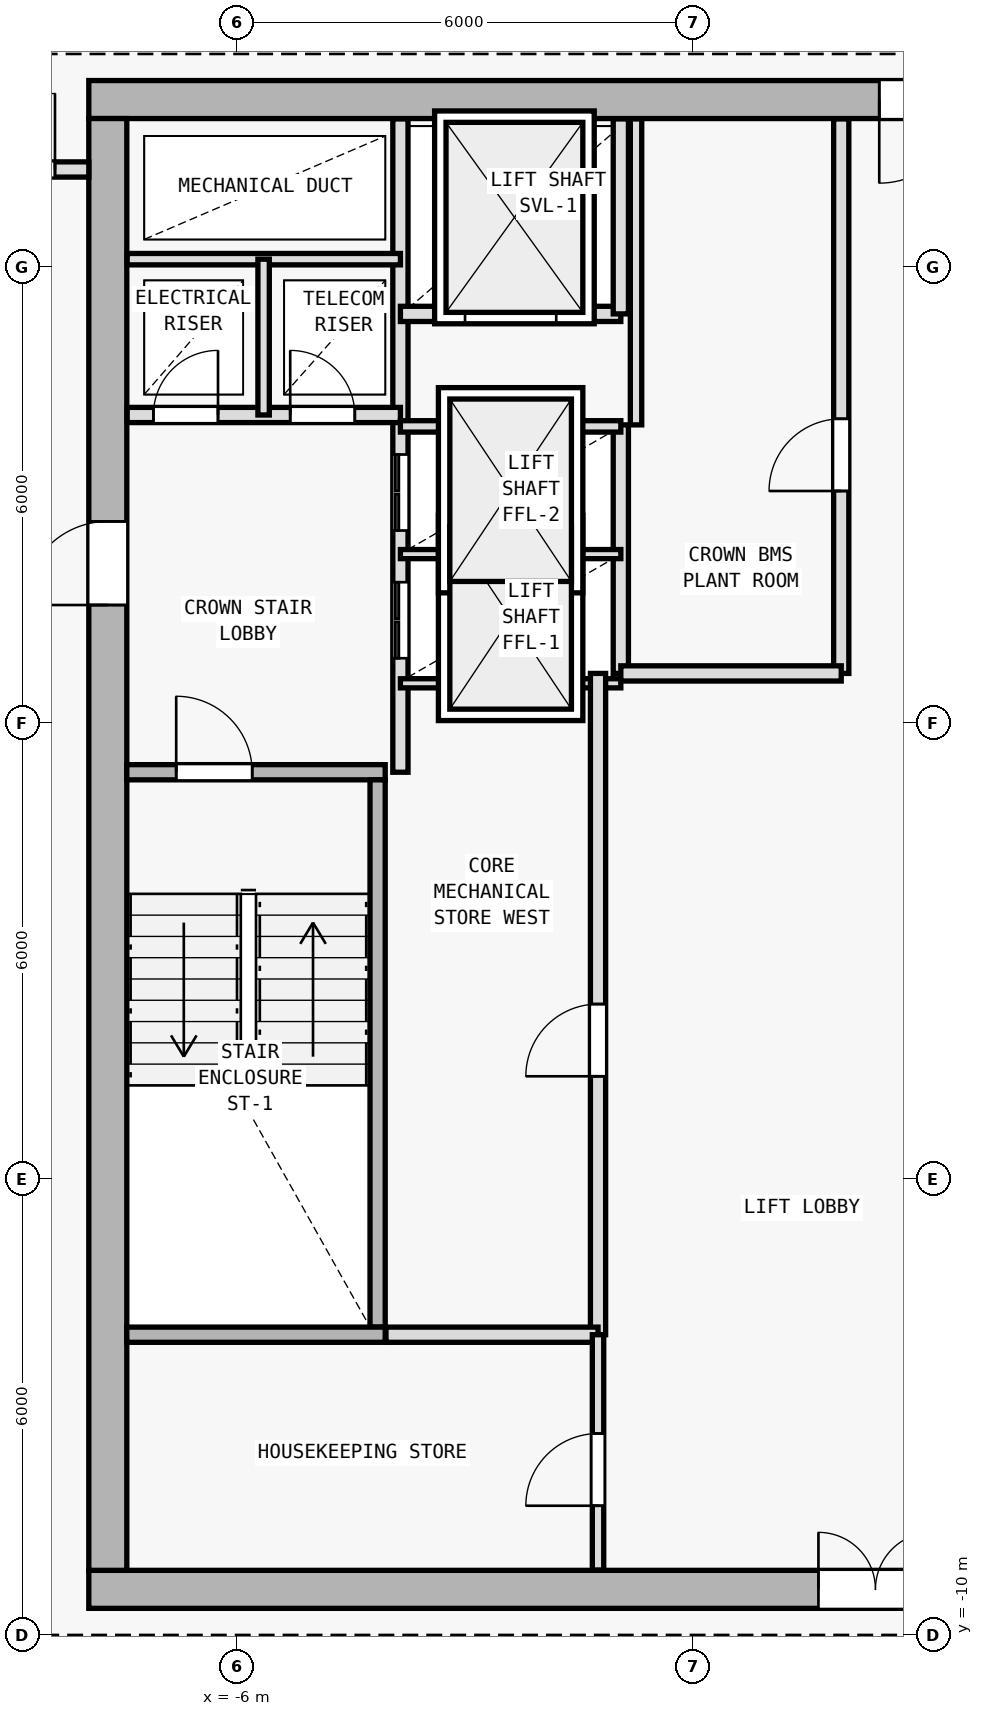
"""IFC4 building model, lengths in metres.
Left out: names, types, materials, properties, quantities, classifications, styles, units other than length and angle.
Written with IfcOpenShell. Run it as: python <this file> out.ifc"""

import sys

from ifc_helpers import new_model, si_unit, direction, frame, frame_2d, origin, origin_2d, place, context, subcontext, project, spatial, rectangle, i_section, extrude, element, fill, save


model = new_model("IFC4")
c1 = context("Model", 3, precision=1e-05, world=origin(), true_north=direction((0.0, 1.0)))
c2 = subcontext(c1, "Body", "Model", "MODEL_VIEW")
j1 = project(units=[si_unit("LENGTHUNIT", "METRE"), si_unit("PLANEANGLEUNIT", "RADIAN")], contexts=[c1])
p1 = place(None, origin())
s1 = spatial("IfcSite", under=j1, at=p1, CompositionType="ELEMENT")
p2 = place(p1, origin())
s2 = spatial("IfcBuilding", under=s1, at=p2, CompositionType="ELEMENT")
p3 = place(p2, frame((0.0, 0.0, 312.0)))
s3 = spatial("IfcBuildingStorey", under=s2, at=p3, CompositionType="ELEMENT", Elevation=312.0)
for number, where, z_axis, x_axis in (
    (1, (-7.7, -9.4, 0.0), (0.0, 0.0, 1.0), (1.0, 0.0, 0.0)),
    (2, (-7.7, 10.2, 0.0), (0.0, 0.0, 1.0), (1.0, 0.0, 0.0)),
    (3, (0.0, -9.4, 0.0), (0.0, 0.0, 1.0), (1.0, 0.0, 0.0)),
    (4, (-7.7, 2.0, 0.0), (0.0, 0.0, 1.0), (1.0, 0.0, 0.0)),
):
    element("IfcColumn", number, at=place(p3, frame(where, z_axis=z_axis, x_axis=x_axis)), inside=s3, PredefinedType="COLUMN", context=c2, shape_type="SweptSolid", body=[
        extrude(i_section(OverallWidth=0.374, OverallDepth=0.372, WebThickness=0.012, FlangeThickness=0.02, FilletRadius=0.015, at=origin_2d()), origin(), (0.0, 0.0, 1.0), 3.6),
    ])
p4 = place(p3, frame((-7.95, -9.4, 0.0), z_axis=(0.0, 0.0, 1.0), x_axis=(1.0, 0.0, 0.0)))
e5 = element("IfcWall", 5, at=p4, inside=s3, PredefinedType="SHEAR", context=c2, shape_type="SweptSolid", body=[
    extrude(rectangle(XDim=15.9, YDim=0.5, at=frame_2d((7.95, 0.0))), origin(), (0.0, 0.0, 1.0), 3.34),
])
p5 = place(p4, frame((9.6, 0.0, 0.0)))
e6 = element("IfcOpeningElement", 6, at=p5, cuts=e5, PredefinedType="OPENING", context=c2, shape_type="SweptSolid", body=[
    extrude(rectangle(XDim=1.5, YDim=2.2, at=frame_2d((0.75, 1.1))), frame((0.0, 0.26, 0.0), z_axis=(0.0, -1.0, 0.0), x_axis=(1.0, 0.0, 0.0)), (0.0, 0.0, 1.0), 0.52),
])
p6 = place(p3, frame((7.95, 10.2, 0.0), z_axis=(0.0, 0.0, 1.0), x_axis=(-1.0, 0.0, 0.0)))
e7 = element("IfcWall", 7, at=p6, inside=s3, PredefinedType="SHEAR", context=c2, shape_type="SweptSolid", body=[
    extrude(rectangle(XDim=15.9, YDim=0.5, at=frame_2d((7.95, 0.0))), origin(), (0.0, 0.0, 1.0), 3.34),
])
p7 = place(p6, frame((4.4, 0.0, 0.0)))
e8 = element("IfcOpeningElement", 8, at=p7, cuts=e7, PredefinedType="OPENING", context=c2, shape_type="SweptSolid", body=[
    extrude(rectangle(XDim=1.1, YDim=2.15, at=frame_2d((0.55, 1.075))), frame((0.0, 0.26, 0.0), z_axis=(0.0, -1.0, 0.0), x_axis=(1.0, 0.0, 0.0)), (0.0, 0.0, 1.0), 0.52),
])
p8 = place(p3, frame((-7.7, -9.15, 0.0), z_axis=(0.0, 0.0, 1.0), x_axis=(0.0, 1.0, 0.0)))
e9 = element("IfcWall", 9, at=p8, inside=s3, PredefinedType="SHEAR", context=c2, shape_type="SweptSolid", body=[
    extrude(rectangle(XDim=19.1, YDim=0.5, at=frame_2d((9.55, 0.0))), origin(), (0.0, 0.0, 1.0), 3.34),
])
p9 = place(p8, frame((12.7, 0.0, 0.0)))
e10 = element("IfcOpeningElement", 10, at=p9, cuts=e9, PredefinedType="OPENING", context=c2, shape_type="SweptSolid", body=[
    extrude(rectangle(XDim=1.1, YDim=2.15, at=frame_2d((0.55, 1.075))), frame((0.0, 0.26, 0.0), z_axis=(0.0, -1.0, 0.0), x_axis=(1.0, 0.0, 0.0)), (0.0, 0.0, 1.0), 0.52),
])
p10 = place(p3, frame((-7.45, 1.35, 0.0), z_axis=(0.0, 0.0, 1.0), x_axis=(1.0, 0.0, 0.0)))
e11 = element("IfcWall", 11, at=p10, inside=s3, PredefinedType="SOLIDWALL", context=c2, shape_type="SweptSolid", body=[
    extrude(rectangle(XDim=3.4, YDim=0.2, at=frame_2d((1.7, 0.0))), origin(), (0.0, 0.0, 1.0), 3.34),
])
p11 = place(p10, frame((0.65, 0.0, 0.0)))
e12 = element("IfcOpeningElement", 12, at=p11, cuts=e11, PredefinedType="OPENING", context=c2, shape_type="SweptSolid", body=[
    extrude(rectangle(XDim=1.0, YDim=2.15, at=frame_2d((0.5, 1.075))), frame((0.0, 0.11, 0.0), z_axis=(0.0, -1.0, 0.0), x_axis=(1.0, 0.0, 0.0)), (0.0, 0.0, 1.0), 0.22),
])
p12 = place(p3, frame((-4.15, -5.95, 0.0), z_axis=(0.0, 0.0, 1.0), x_axis=(0.0, 1.0, 0.0)))
e13 = element("IfcWall", 13, at=p12, inside=s3, PredefinedType="SOLIDWALL", context=c2, shape_type="SweptSolid", body=[
    extrude(rectangle(XDim=7.2, YDim=0.2, at=frame_2d((3.6, 0.0))), origin(), (0.0, 0.0, 1.0), 3.34),
])
p13 = place(p3, frame((-3.85, 1.35, 0.0), z_axis=(0.0, 0.0, 1.0), x_axis=(0.0, 1.0, 0.0)))
e14 = element("IfcWall", 14, at=p13, inside=s3, PredefinedType="SOLIDWALL", context=c2, shape_type="SweptSolid", body=[
    extrude(rectangle(XDim=8.595, YDim=0.2, at=frame_2d((4.297, 0.0))), origin(), (0.0, 0.0, 1.0), 3.34),
])
p14 = place(p13, frame((1.5, 0.0, 0.0)))
e15 = element("IfcOpeningElement", 15, at=p14, cuts=e14, PredefinedType="OPENING", context=c2, shape_type="SweptSolid", body=[
    extrude(rectangle(XDim=1.0, YDim=2.15, at=frame_2d((0.5, 1.075))), frame((0.0, 0.11, 0.0), z_axis=(0.0, -1.0, 0.0), x_axis=(1.0, 0.0, 0.0)), (0.0, 0.0, 1.0), 0.22),
])
p15 = place(p13, frame((3.18, 0.0, 0.0)))
e16 = element("IfcOpeningElement", 16, at=p15, cuts=e14, PredefinedType="OPENING", context=c2, shape_type="SweptSolid", body=[
    extrude(rectangle(XDim=1.0, YDim=2.15, at=frame_2d((0.5, 1.075))), frame((0.0, 0.11, 0.0), z_axis=(0.0, -1.0, 0.0), x_axis=(1.0, 0.0, 0.0)), (0.0, 0.0, 1.0), 0.22),
])
p16 = place(p3, frame((-7.445, 6.05, 0.0), z_axis=(0.0, 0.0, 1.0), x_axis=(1.0, 0.0, 0.0)))
e17 = element("IfcWall", 17, at=p16, inside=s3, PredefinedType="SOLIDWALL", context=c2, shape_type="SweptSolid", body=[
    extrude(rectangle(XDim=3.595, YDim=0.2, at=frame_2d((1.797, 0.0))), origin(), (0.0, 0.0, 1.0), 3.34),
])
p17 = place(p16, frame((0.345, 0.0, 0.0)))
e18 = element("IfcOpeningElement", 18, at=p17, cuts=e17, PredefinedType="OPENING", context=c2, shape_type="SweptSolid", body=[
    extrude(rectangle(XDim=0.85, YDim=2.1, at=frame_2d((0.425, 1.05))), frame((0.0, 0.11, 0.0), z_axis=(0.0, -1.0, 0.0), x_axis=(1.0, 0.0, 0.0)), (0.0, 0.0, 1.0), 0.22),
])
p18 = place(p16, frame((2.145, 0.0, 0.0)))
e19 = element("IfcOpeningElement", 19, at=p18, cuts=e17, PredefinedType="OPENING", context=c2, shape_type="SweptSolid", body=[
    extrude(rectangle(XDim=0.85, YDim=2.1, at=frame_2d((0.425, 1.05))), frame((0.0, 0.11, 0.0), z_axis=(0.0, -1.0, 0.0), x_axis=(1.0, 0.0, 0.0)), (0.0, 0.0, 1.0), 0.22),
])
p19 = place(p3, frame((-7.445, 8.1, 0.0), z_axis=(0.0, 0.0, 1.0), x_axis=(1.0, 0.0, 0.0)))
e20 = element("IfcWall", 20, at=p19, inside=s3, PredefinedType="PARTITIONING", context=c2, shape_type="SweptSolid", body=[
    extrude(rectangle(XDim=3.595, YDim=0.15, at=frame_2d((1.797, 0.0))), origin(), (0.0, 0.0, 1.0), 3.34),
])
p20 = place(p3, frame((-5.65, 6.05, 0.0), z_axis=(0.0, 0.0, 1.0), x_axis=(0.0, 1.0, 0.0)))
e21 = element("IfcWall", 21, at=p20, inside=s3, PredefinedType="PARTITIONING", context=c2, shape_type="SweptSolid", body=[
    extrude(rectangle(XDim=2.05, YDim=0.15, at=frame_2d((1.025, 0.0))), origin(), (0.0, 0.0, 1.0), 3.34),
])
p21 = place(p3, frame((-0.95, 2.65, 0.0), z_axis=(0.0, 0.0, 1.0), x_axis=(0.0, 1.0, 0.0)))
e22 = element("IfcWall", 22, at=p21, inside=s3, PredefinedType="SOLIDWALL", context=c2, shape_type="SweptSolid", body=[
    extrude(rectangle(XDim=3.27, YDim=0.2, at=frame_2d((1.635, 0.0))), origin(), (0.0, 0.0, 1.0), 3.34),
])
for number, where, z_axis, x_axis in (
    (23, (-3.85, 2.52, 0.0), (0.0, 0.0, 1.0), (1.0, 0.0, 0.0)),
    (24, (-3.85, 4.22, 0.0), (0.0, 0.0, 1.0), (1.0, 0.0, 0.0)),
):
    element("IfcWall", number, at=place(p3, frame(where, z_axis=z_axis, x_axis=x_axis)), inside=s3, PredefinedType="PARTITIONING", context=c2, shape_type="SweptSolid", body=[
        extrude(rectangle(XDim=2.9, YDim=0.12, at=frame_2d((1.45, 0.0))), origin(), (0.0, 0.0, 1.0), 3.34),
    ])
p22 = place(p3, frame((-3.85, 5.9, 0.0), z_axis=(0.0, 0.0, 1.0), x_axis=(1.0, 0.0, 0.0)))
e25 = element("IfcWall", 25, at=p22, inside=s3, PredefinedType="PARTITIONING", context=c2, shape_type="SweptSolid", body=[
    extrude(rectangle(XDim=2.9, YDim=0.15, at=frame_2d((1.45, 0.0))), origin(), (0.0, 0.0, 1.0), 3.34),
])
p23 = place(p3, frame((-3.85, 7.38, 0.0), z_axis=(0.0, 0.0, 1.0), x_axis=(1.0, 0.0, 0.0)))
e26 = element("IfcWall", 26, at=p23, inside=s3, PredefinedType="SOLIDWALL", context=c2, shape_type="SweptSolid", body=[
    extrude(rectangle(XDim=2.9, YDim=0.2, at=frame_2d((1.45, 0.0))), origin(), (0.0, 0.0, 1.0), 3.34),
])
p24 = place(p23, frame((0.85, 0.0, 0.0)))
e27 = element("IfcOpeningElement", 27, at=p24, cuts=e26, PredefinedType="OPENING", context=c2, shape_type="SweptSolid", body=[
    extrude(rectangle(XDim=1.2, YDim=2.2, at=frame_2d((0.6, 1.1))), frame((0.0, 0.11, 0.0), z_axis=(0.0, -1.0, 0.0), x_axis=(1.0, 0.0, 0.0)), (0.0, 0.0, 1.0), 0.22),
])
p25 = place(p3, frame((-0.95, 7.38, 0.0), z_axis=(0.0, 0.0, 1.0), x_axis=(0.0, 1.0, 0.0)))
e28 = element("IfcWall", 28, at=p25, inside=s3, PredefinedType="SOLIDWALL", context=c2, shape_type="SweptSolid", body=[
    extrude(rectangle(XDim=2.565, YDim=0.2, at=frame_2d((1.283, 0.0))), origin(), (0.0, 0.0, 1.0), 3.34),
])
p26 = place(p3, frame((-1.25, -6.05, 0.0), z_axis=(0.0, 0.0, 1.0), x_axis=(0.0, 1.0, 0.0)))
e29 = element("IfcWall", 29, at=p26, inside=s3, PredefinedType="SOLIDWALL", context=c2, shape_type="SweptSolid", body=[
    extrude(rectangle(XDim=8.7, YDim=0.2, at=frame_2d((4.35, 0.0))), origin(), (0.0, 0.0, 1.0), 3.34),
])
p27 = place(p26, frame((3.4, 0.0, 0.0)))
e30 = element("IfcOpeningElement", 30, at=p27, cuts=e29, PredefinedType="OPENING", context=c2, shape_type="SweptSolid", body=[
    extrude(rectangle(XDim=0.95, YDim=2.1, at=frame_2d((0.475, 1.05))), frame((0.0, 0.11, 0.0), z_axis=(0.0, -1.0, 0.0), x_axis=(1.0, 0.0, 0.0)), (0.0, 0.0, 1.0), 0.22),
])
p28 = place(p3, frame((1.95, 2.65, 0.0), z_axis=(0.0, 0.0, 1.0), x_axis=(0.0, 1.0, 0.0)))
e31 = element("IfcWall", 31, at=p28, inside=s3, PredefinedType="SOLIDWALL", context=c2, shape_type="SweptSolid", body=[
    extrude(rectangle(XDim=7.295, YDim=0.2, at=frame_2d((3.647, 0.0))), origin(), (0.0, 0.0, 1.0), 3.34),
])
p29 = place(p28, frame((2.4, 0.0, 0.0)))
e32 = element("IfcOpeningElement", 32, at=p29, cuts=e31, PredefinedType="OPENING", context=c2, shape_type="SweptSolid", body=[
    extrude(rectangle(XDim=0.95, YDim=2.1, at=frame_2d((0.475, 1.05))), frame((0.0, 0.11, 0.0), z_axis=(0.0, -1.0, 0.0), x_axis=(1.0, 0.0, 0.0)), (0.0, 0.0, 1.0), 0.22),
])
p30 = place(p3, frame((-0.95, 2.65, 0.0), z_axis=(0.0, 0.0, 1.0), x_axis=(1.0, 0.0, 0.0)))
e33 = element("IfcWall", 33, at=p30, inside=s3, PredefinedType="SOLIDWALL", context=c2, shape_type="SweptSolid", body=[
    extrude(rectangle(XDim=2.9, YDim=0.2, at=frame_2d((1.45, 0.0))), origin(), (0.0, 0.0, 1.0), 3.34),
])
p31 = place(p3, frame((-0.75, 5.92, 0.0), z_axis=(0.0, 0.0, 1.0), x_axis=(0.0, 1.0, 0.0)))
e34 = element("IfcWall", 34, at=p31, inside=s3, PredefinedType="PARTITIONING", context=c2, shape_type="SweptSolid", body=[
    extrude(rectangle(XDim=4.025, YDim=0.15, at=frame_2d((2.013, 0.0))), origin(), (0.0, 0.0, 1.0), 3.34),
])
p32 = place(p3, frame((-7.45, -6.05, 0.0), z_axis=(0.0, 0.0, 1.0), x_axis=(1.0, 0.0, 0.0)))
e35 = element("IfcWall", 35, at=p32, inside=s3, PredefinedType="SOLIDWALL", context=c2, shape_type="SweptSolid", body=[
    extrude(rectangle(XDim=3.4, YDim=0.2, at=frame_2d((1.7, 0.0))), origin(), (0.0, 0.0, 1.0), 3.34),
])
p33 = place(p3, frame((-4.04, -6.05, 0.0), z_axis=(0.0, 0.0, 1.0), x_axis=(1.0, 0.0, 0.0)))
e36 = element("IfcWall", 36, at=p33, inside=s3, PredefinedType="SOLIDWALL", context=c2, shape_type="SweptSolid", body=[
    extrude(rectangle(XDim=2.79, YDim=0.2, at=frame_2d((1.395, 0.0))), origin(), (0.0, 0.0, 1.0), 3.34),
])
p34 = place(p3, frame((-1.25, -9.145, 0.0), z_axis=(0.0, 0.0, 1.0), x_axis=(0.0, 1.0, 0.0)))
e37 = element("IfcWall", 37, at=p34, inside=s3, PredefinedType="PARTITIONING", context=c2, shape_type="SweptSolid", body=[
    extrude(rectangle(XDim=3.095, YDim=0.15, at=frame_2d((1.547, 0.0))), origin(), (0.0, 0.0, 1.0), 3.34),
])
p35 = place(p34, frame((0.845, 0.0, 0.0)))
e38 = element("IfcOpeningElement", 38, at=p35, cuts=e37, PredefinedType="OPENING", context=c2, shape_type="SweptSolid", body=[
    extrude(rectangle(XDim=0.95, YDim=2.1, at=frame_2d((0.475, 1.05))), frame((0.0, 0.085, 0.0), z_axis=(0.0, -1.0, 0.0), x_axis=(1.0, 0.0, 0.0)), (0.0, 0.0, 1.0), 0.17),
])
p36 = place(p3, frame((-9.89, 9.28, 0.0), z_axis=(0.0, 0.0, 1.0), x_axis=(1.0, 0.0, 0.0)))
e39 = element("IfcWall", 39, at=p36, inside=s3, PredefinedType="SOLIDWALL", context=c2, shape_type="SweptSolid", body=[
    extrude(rectangle(XDim=1.94, YDim=0.2, at=frame_2d((0.97, 0.0))), origin(), (0.0, 0.0, 1.0), 3.34),
])
p37 = place(p36, frame((0.495, 0.0, 0.0)))
e40 = element("IfcOpeningElement", 40, at=p37, cuts=e39, PredefinedType="OPENING", context=c2, shape_type="SweptSolid", body=[
    extrude(rectangle(XDim=1.0, YDim=2.15, at=frame_2d((0.5, 1.075))), frame((0.0, 0.11, 0.0), z_axis=(0.0, -1.0, 0.0), x_axis=(1.0, 0.0, 0.0)), (0.0, 0.0, 1.0), 0.22),
])
p38 = place(p5, origin())
e41 = element("IfcDoor", 41, at=p38, inside=s3, OperationType="DOUBLE_DOOR_SINGLE_SWING", PredefinedType="DOOR", context=c2, shape_type="SweptSolid", body=[
    extrude(rectangle(XDim=1.5, YDim=2.2, at=frame_2d((0.75, 1.1))), frame((0.0, 0.025, 0.0), z_axis=(0.0, -1.0, 0.0), x_axis=(1.0, 0.0, 0.0)), (0.0, 0.0, 1.0), 0.05),
])
fill(e6, e41)
p39 = place(p9, origin())
e42 = element("IfcDoor", 42, at=p39, inside=s3, OperationType="SINGLE_SWING_LEFT", PredefinedType="DOOR", context=c2, shape_type="SweptSolid", body=[
    extrude(rectangle(XDim=1.1, YDim=2.15, at=frame_2d((0.55, 1.075))), frame((0.0, 0.025, 0.0), z_axis=(0.0, -1.0, 0.0), x_axis=(1.0, 0.0, 0.0)), (0.0, 0.0, 1.0), 0.05),
])
fill(e10, e42)
p40 = place(p7, origin())
e43 = element("IfcDoor", 43, at=p40, inside=s3, OperationType="SINGLE_SWING_RIGHT", PredefinedType="DOOR", context=c2, shape_type="SweptSolid", body=[
    extrude(rectangle(XDim=1.1, YDim=2.15, at=frame_2d((0.55, 1.075))), frame((0.0, 0.025, 0.0), z_axis=(0.0, -1.0, 0.0), x_axis=(1.0, 0.0, 0.0)), (0.0, 0.0, 1.0), 0.05),
])
fill(e8, e43)
p41 = place(p11, origin())
e44 = element("IfcDoor", 44, at=p41, inside=s3, OperationType="SINGLE_SWING_LEFT", PredefinedType="DOOR", context=c2, shape_type="SweptSolid", body=[
    extrude(rectangle(XDim=1.0, YDim=2.15, at=frame_2d((0.5, 1.075))), frame((0.0, 0.025, 0.0), z_axis=(0.0, -1.0, 0.0), x_axis=(1.0, 0.0, 0.0)), (0.0, 0.0, 1.0), 0.05),
])
fill(e12, e44)
p42 = place(p17, origin())
e45 = element("IfcDoor", 45, at=p42, inside=s3, OperationType="SINGLE_SWING_RIGHT", PredefinedType="DOOR", context=c2, shape_type="SweptSolid", body=[
    extrude(rectangle(XDim=0.85, YDim=2.1, at=frame_2d((0.425, 1.05))), frame((0.0, 0.025, 0.0), z_axis=(0.0, -1.0, 0.0), x_axis=(1.0, 0.0, 0.0)), (0.0, 0.0, 1.0), 0.05),
])
fill(e18, e45)
p43 = place(p18, origin())
e46 = element("IfcDoor", 46, at=p43, inside=s3, OperationType="SINGLE_SWING_LEFT", PredefinedType="DOOR", context=c2, shape_type="SweptSolid", body=[
    extrude(rectangle(XDim=0.85, YDim=2.1, at=frame_2d((0.425, 1.05))), frame((0.0, 0.025, 0.0), z_axis=(0.0, -1.0, 0.0), x_axis=(1.0, 0.0, 0.0)), (0.0, 0.0, 1.0), 0.05),
])
fill(e19, e46)
p44 = place(p24, origin())
e47 = element("IfcDoor", 47, at=p44, inside=s3, OperationType="DOUBLE_DOOR_SLIDING", PredefinedType="DOOR", context=c2, shape_type="SweptSolid", body=[
    extrude(rectangle(XDim=1.2, YDim=2.2, at=frame_2d((0.6, 1.1))), frame((0.0, 0.025, 0.0), z_axis=(0.0, -1.0, 0.0), x_axis=(1.0, 0.0, 0.0)), (0.0, 0.0, 1.0), 0.05),
])
fill(e27, e47)
p45 = place(p27, origin())
e48 = element("IfcDoor", 48, at=p45, inside=s3, OperationType="SINGLE_SWING_LEFT", PredefinedType="DOOR", context=c2, shape_type="SweptSolid", body=[
    extrude(rectangle(XDim=0.95, YDim=2.1, at=frame_2d((0.475, 1.05))), frame((0.0, 0.025, 0.0), z_axis=(0.0, -1.0, 0.0), x_axis=(1.0, 0.0, 0.0)), (0.0, 0.0, 1.0), 0.05),
])
fill(e30, e48)
p46 = place(p29, origin())
e49 = element("IfcDoor", 49, at=p46, inside=s3, OperationType="SINGLE_SWING_LEFT", PredefinedType="DOOR", context=c2, shape_type="SweptSolid", body=[
    extrude(rectangle(XDim=0.95, YDim=2.1, at=frame_2d((0.475, 1.05))), frame((0.0, 0.025, 0.0), z_axis=(0.0, -1.0, 0.0), x_axis=(1.0, 0.0, 0.0)), (0.0, 0.0, 1.0), 0.05),
])
fill(e32, e49)
p47 = place(p14, origin())
e50 = element("IfcDoor", 50, at=p47, inside=s3, OperationType="DOUBLE_DOOR_SLIDING", PredefinedType="DOOR", context=c2, shape_type="SweptSolid", body=[
    extrude(rectangle(XDim=1.0, YDim=2.15, at=frame_2d((0.5, 1.075))), frame((0.0, 0.025, 0.0), z_axis=(0.0, -1.0, 0.0), x_axis=(1.0, 0.0, 0.0)), (0.0, 0.0, 1.0), 0.05),
])
fill(e15, e50)
p48 = place(p15, origin())
e51 = element("IfcDoor", 51, at=p48, inside=s3, OperationType="DOUBLE_DOOR_SLIDING", PredefinedType="DOOR", context=c2, shape_type="SweptSolid", body=[
    extrude(rectangle(XDim=1.0, YDim=2.15, at=frame_2d((0.5, 1.075))), frame((0.0, 0.025, 0.0), z_axis=(0.0, -1.0, 0.0), x_axis=(1.0, 0.0, 0.0)), (0.0, 0.0, 1.0), 0.05),
])
fill(e16, e51)
p49 = place(p35, origin())
e52 = element("IfcDoor", 52, at=p49, inside=s3, OperationType="SINGLE_SWING_LEFT", PredefinedType="DOOR", context=c2, shape_type="SweptSolid", body=[
    extrude(rectangle(XDim=0.95, YDim=2.1, at=frame_2d((0.475, 1.05))), frame((0.0, 0.025, 0.0), z_axis=(0.0, -1.0, 0.0), x_axis=(1.0, 0.0, 0.0)), (0.0, 0.0, 1.0), 0.05),
])
fill(e38, e52)
p50 = place(p37, origin())
e53 = element("IfcDoor", 53, at=p50, inside=s3, OperationType="SINGLE_SWING_RIGHT", PredefinedType="DOOR", context=c2, shape_type="SweptSolid", body=[
    extrude(rectangle(XDim=1.0, YDim=2.15, at=frame_2d((0.5, 1.075))), frame((0.0, 0.025, 0.0), z_axis=(0.0, -1.0, 0.0), x_axis=(1.0, 0.0, 0.0)), (0.0, 0.0, 1.0), 0.05),
])
fill(e40, e53)
save(model, sys.argv[1])
